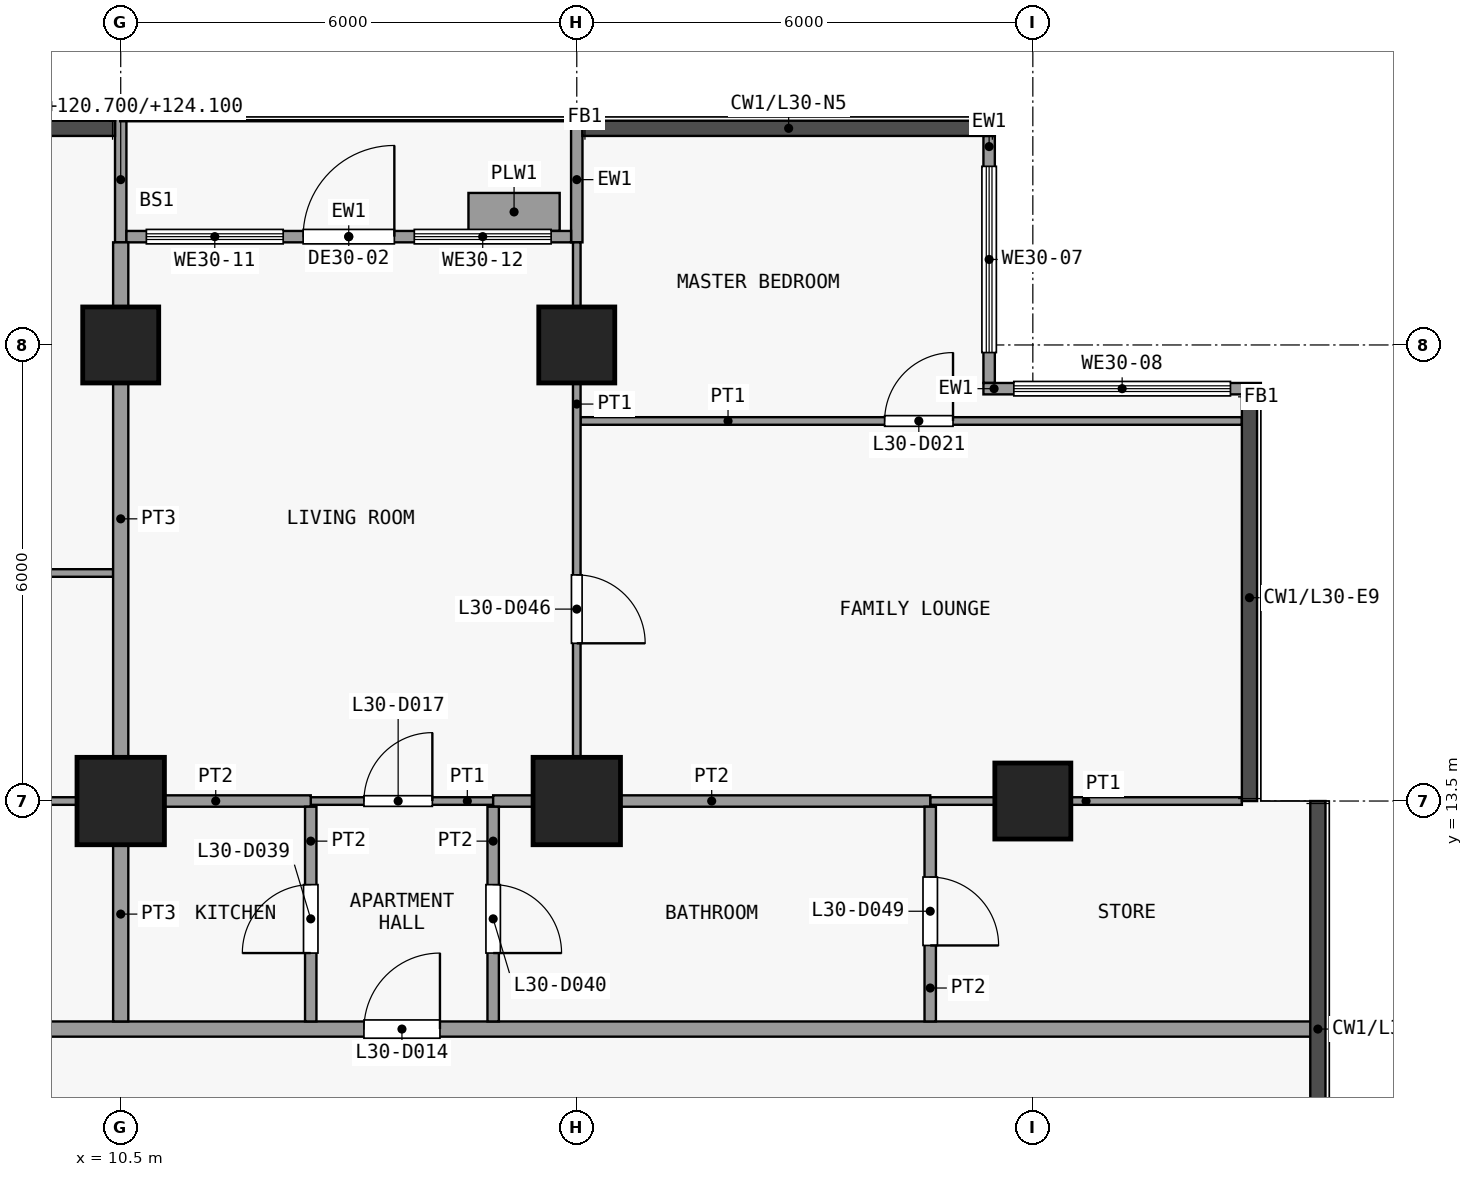
"""IFC4 building model, lengths in metres.
Left out: names, types, materials, properties, quantities, classifications, styles, units other than length and angle.
Written with IfcOpenShell. Run it as: python <this file> out.ifc"""

import sys

from ifc_helpers import new_model, si_unit, direction, frame, frame_2d, origin, origin_2d, place, context, subcontext, project, spatial, rectangle, extrude, element, fill, save


model = new_model("IFC4")
c1 = context("Model", 3, precision=1e-05, world=origin(), true_north=direction((0.0, 1.0)))
c2 = subcontext(c1, "Body", "Model", "MODEL_VIEW")
j1 = project(units=[si_unit("LENGTHUNIT", "METRE"), si_unit("PLANEANGLEUNIT", "RADIAN")], contexts=[c1])
p1 = place(None, origin())
s1 = spatial("IfcSite", under=j1, at=p1, CompositionType="ELEMENT")
p2 = place(p1, origin())
s2 = spatial("IfcBuilding", under=s1, at=p2, CompositionType="ELEMENT")
p3 = place(p2, frame((0.0, 0.0, 120.7)))
s3 = spatial("IfcBuildingStorey", under=s2, at=p3, CompositionType="ELEMENT", Elevation=120.7)
p4 = place(p3, frame((10.5, 13.5, 0.0), z_axis=(0.0, 0.0, 1.0), x_axis=(1.0, 0.0, 0.0)))
e1 = element("IfcColumn", 1, at=p4, inside=s3, PredefinedType="COLUMN", context=c2, shape_type="SweptSolid", body=[
    extrude(rectangle(XDim=1.15, YDim=1.15, at=origin_2d()), origin(), (0.0, 0.0, 1.0), 3.6),
])
p5 = place(p3, frame((10.5, 19.5, 0.0), z_axis=(0.0, 0.0, 1.0), x_axis=(1.0, 0.0, 0.0)))
e2 = element("IfcColumn", 2, at=p5, inside=s3, PredefinedType="COLUMN", context=c2, shape_type="SweptSolid", body=[
    extrude(rectangle(XDim=1.0, YDim=1.0, at=origin_2d()), origin(), (0.0, 0.0, 1.0), 3.6),
])
p6 = place(p3, frame((16.5, 13.5, 0.0), z_axis=(0.0, 0.0, 1.0), x_axis=(1.0, 0.0, 0.0)))
e3 = element("IfcColumn", 3, at=p6, inside=s3, PredefinedType="COLUMN", context=c2, shape_type="SweptSolid", body=[
    extrude(rectangle(XDim=1.15, YDim=1.15, at=origin_2d()), origin(), (0.0, 0.0, 1.0), 3.6),
])
for number, where, z_axis, x_axis in (
    (4, (16.5, 19.5, 0.0), (0.0, 0.0, 1.0), (1.0, 0.0, 0.0)),
    (5, (22.5, 13.5, 0.0), (0.0, 0.0, 1.0), (1.0, 0.0, 0.0)),
):
    element("IfcColumn", number, at=place(p3, frame(where, z_axis=z_axis, x_axis=x_axis)), inside=s3, PredefinedType="COLUMN", context=c2, shape_type="SweptSolid", body=[
        extrude(rectangle(XDim=1.0, YDim=1.0, at=origin_2d()), origin(), (0.0, 0.0, 1.0), 3.6),
    ])
p7 = place(p3, frame((21.925, 22.25, 0.0), z_axis=(0.0, 0.0, 1.0), x_axis=(0.0, -1.0, 0.0)))
e6 = element("IfcWall", 6, at=p7, inside=s3, PredefinedType="SOLIDWALL", context=c2, shape_type="SweptSolid", body=[
    extrude(rectangle(XDim=3.25, YDim=0.15, at=frame_2d((1.625, 0.0))), origin(), (0.0, 0.0, 1.0), 3.3),
])
p8 = place(p7, frame((0.4, 0.0, 0.9)))
e7 = element("IfcOpeningElement", 7, at=p8, cuts=e6, PredefinedType="OPENING", context=c2, shape_type="SweptSolid", body=[
    extrude(rectangle(XDim=2.45, YDim=2.4, at=frame_2d((1.225, 1.2))), frame((0.0, 0.085, 0.0), z_axis=(0.0, -1.0, 0.0), x_axis=(1.0, 0.0, 0.0)), (0.0, 0.0, 1.0), 0.17),
])
p9 = place(p3, frame((21.85, 18.925, 0.0), z_axis=(0.0, 0.0, 1.0), x_axis=(1.0, 0.0, 0.0)))
e8 = element("IfcWall", 8, at=p9, inside=s3, PredefinedType="SOLIDWALL", context=c2, shape_type="SweptSolid", body=[
    extrude(rectangle(XDim=3.65, YDim=0.15, at=frame_2d((1.825, 0.0))), origin(), (0.0, 0.0, 1.0), 3.3),
])
p10 = place(p9, frame((0.4, 0.0, 0.9)))
e9 = element("IfcOpeningElement", 9, at=p10, cuts=e8, PredefinedType="OPENING", context=c2, shape_type="SweptSolid", body=[
    extrude(rectangle(XDim=2.85, YDim=2.4, at=frame_2d((1.425, 1.2))), frame((0.0, 0.085, 0.0), z_axis=(0.0, -1.0, 0.0), x_axis=(1.0, 0.0, 0.0)), (0.0, 0.0, 1.0), 0.17),
])
p11 = place(p3, frame((10.5, 20.85, 0.0), z_axis=(0.0, 0.0, 1.0), x_axis=(0.0, 1.0, 0.0)))
e10 = element("IfcWall", 10, at=p11, inside=s3, PredefinedType="SOLIDWALL", context=c2, shape_type="SweptSolid", body=[
    extrude(rectangle(XDim=1.65, YDim=0.15, at=frame_2d((0.825, 0.0))), origin(), (0.0, 0.0, 1.0), 3.4),
])
p12 = place(p3, frame((16.5, 20.85, 0.0), z_axis=(0.0, 0.0, 1.0), x_axis=(0.0, 1.0, 0.0)))
e11 = element("IfcWall", 11, at=p12, inside=s3, PredefinedType="SOLIDWALL", context=c2, shape_type="SweptSolid", body=[
    extrude(rectangle(XDim=1.65, YDim=0.15, at=frame_2d((0.825, 0.0))), origin(), (0.0, 0.0, 1.0), 3.3),
])
p13 = place(p3, frame((10.575, 20.925, 0.0), z_axis=(0.0, 0.0, 1.0), x_axis=(1.0, 0.0, 0.0)))
e12 = element("IfcWall", 12, at=p13, inside=s3, PredefinedType="SOLIDWALL", context=c2, shape_type="SweptSolid", body=[
    extrude(rectangle(XDim=5.85, YDim=0.15, at=frame_2d((2.925, 0.0))), origin(), (0.0, 0.0, 1.0), 3.3),
])
p14 = place(p13, frame((2.325, 0.0, 0.0)))
e13 = element("IfcOpeningElement", 13, at=p14, cuts=e12, PredefinedType="OPENING", context=c2, shape_type="SweptSolid", body=[
    extrude(rectangle(XDim=1.2, YDim=2.4, at=frame_2d((0.6, 1.2))), frame((0.0, 0.085, 0.0), z_axis=(0.0, -1.0, 0.0), x_axis=(1.0, 0.0, 0.0)), (0.0, 0.0, 1.0), 0.17),
])
p15 = place(p13, frame((0.262, 0.0, 0.9)))
e14 = element("IfcOpeningElement", 14, at=p15, cuts=e12, PredefinedType="OPENING", context=c2, shape_type="SweptSolid", body=[
    extrude(rectangle(XDim=1.8, YDim=2.1, at=frame_2d((0.9, 1.05))), frame((0.0, 0.085, 0.0), z_axis=(0.0, -1.0, 0.0), x_axis=(1.0, 0.0, 0.0)), (0.0, 0.0, 1.0), 0.17),
])
p16 = place(p13, frame((3.788, 0.0, 0.9)))
e15 = element("IfcOpeningElement", 15, at=p16, cuts=e12, PredefinedType="OPENING", context=c2, shape_type="SweptSolid", body=[
    extrude(rectangle(XDim=1.8, YDim=2.1, at=frame_2d((0.9, 1.05))), frame((0.0, 0.085, 0.0), z_axis=(0.0, -1.0, 0.0), x_axis=(1.0, 0.0, 0.0)), (0.0, 0.0, 1.0), 0.17),
])
p17 = place(p3, frame((15.075, 21.25, 0.0), z_axis=(0.0, 0.0, 1.0), x_axis=(1.0, 0.0, 0.0)))
e16 = element("IfcWall", 16, at=p17, inside=s3, PredefinedType="USERDEFINED", context=c2, shape_type="SweptSolid", body=[
    extrude(rectangle(XDim=1.2, YDim=0.5, at=frame_2d((0.6, 0.0))), origin(), (0.0, 0.0, 1.0), 0.9),
])
p18 = place(p3, frame((-23.85, 10.5, 0.0), z_axis=(0.0, 0.0, 1.0), x_axis=(1.0, 0.0, 0.0)))
e17 = element("IfcWall", 17, at=p18, inside=s3, PredefinedType="PARTITIONING", context=c2, shape_type="SweptSolid", body=[
    extrude(rectangle(XDim=50.1, YDim=0.2, at=frame_2d((25.05, 0.0))), origin(), (0.0, 0.0, 1.0), 3.3),
])
p19 = place(p18, frame((3.05, 0.0, 0.0)))
e18 = element("IfcOpeningElement", 18, at=p19, cuts=e17, PredefinedType="OPENING", context=c2, shape_type="SweptSolid", body=[
    extrude(rectangle(XDim=1.0, YDim=2.1, at=frame_2d((0.5, 1.05))), frame((0.0, 0.11, 0.0), z_axis=(0.0, -1.0, 0.0), x_axis=(1.0, 0.0, 0.0)), (0.0, 0.0, 1.0), 0.22),
])
p20 = place(p18, frame((17.55, 0.0, 0.0)))
e19 = element("IfcOpeningElement", 19, at=p20, cuts=e17, PredefinedType="OPENING", context=c2, shape_type="SweptSolid", body=[
    extrude(rectangle(XDim=1.0, YDim=2.1, at=frame_2d((0.5, 1.05))), frame((0.0, 0.11, 0.0), z_axis=(0.0, -1.0, 0.0), x_axis=(1.0, 0.0, 0.0)), (0.0, 0.0, 1.0), 0.22),
])
p21 = place(p18, frame((37.55, 0.0, 0.0)))
e20 = element("IfcOpeningElement", 20, at=p21, cuts=e17, PredefinedType="OPENING", context=c2, shape_type="SweptSolid", body=[
    extrude(rectangle(XDim=1.0, YDim=2.1, at=frame_2d((0.5, 1.05))), frame((0.0, 0.11, 0.0), z_axis=(0.0, -1.0, 0.0), x_axis=(1.0, 0.0, 0.0)), (0.0, 0.0, 1.0), 0.22),
])
p22 = place(p3, frame((2.9, 13.5, 0.0), z_axis=(0.0, 0.0, 1.0), x_axis=(1.0, 0.0, 0.0)))
e21 = element("IfcWall", 21, at=p22, inside=s3, PredefinedType="PARTITIONING", context=c2, shape_type="SweptSolid", body=[
    extrude(rectangle(XDim=7.6, YDim=0.1, at=frame_2d((3.8, 0.0))), origin(), (0.0, 0.0, 1.0), 3.3),
])
p23 = place(p3, frame((13.0, 13.5, 0.0), z_axis=(0.0, 0.0, 1.0), x_axis=(1.0, 0.0, 0.0)))
e22 = element("IfcWall", 22, at=p23, inside=s3, PredefinedType="PARTITIONING", context=c2, shape_type="SweptSolid", body=[
    extrude(rectangle(XDim=2.4, YDim=0.1, at=frame_2d((1.2, 0.0))), origin(), (0.0, 0.0, 1.0), 3.3),
])
p24 = place(p23, frame((0.7, 0.0, 0.0)))
e23 = element("IfcOpeningElement", 23, at=p24, cuts=e22, PredefinedType="OPENING", context=c2, shape_type="SweptSolid", body=[
    extrude(rectangle(XDim=0.9, YDim=2.1, at=frame_2d((0.45, 1.05))), frame((0.0, 0.06, 0.0), z_axis=(0.0, -1.0, 0.0), x_axis=(1.0, 0.0, 0.0)), (0.0, 0.0, 1.0), 0.12),
])
p25 = place(p3, frame((21.15, 13.5, 0.0), z_axis=(0.0, 0.0, 1.0), x_axis=(1.0, 0.0, 0.0)))
e24 = element("IfcWall", 24, at=p25, inside=s3, PredefinedType="PARTITIONING", context=c2, shape_type="SweptSolid", body=[
    extrude(rectangle(XDim=4.1, YDim=0.1, at=frame_2d((2.05, 0.0))), origin(), (0.0, 0.0, 1.0), 3.3),
])
p26 = place(p3, frame((10.5, 13.5, 0.0), z_axis=(0.0, 0.0, 1.0), x_axis=(1.0, 0.0, 0.0)))
e25 = element("IfcWall", 25, at=p26, inside=s3, PredefinedType="PARTITIONING", context=c2, shape_type="SweptSolid", body=[
    extrude(rectangle(XDim=2.5, YDim=0.15, at=frame_2d((1.25, 0.0))), origin(), (0.0, 0.0, 1.0), 3.3),
])
p27 = place(p3, frame((15.4, 13.5, 0.0), z_axis=(0.0, 0.0, 1.0), x_axis=(1.0, 0.0, 0.0)))
e26 = element("IfcWall", 26, at=p27, inside=s3, PredefinedType="PARTITIONING", context=c2, shape_type="SweptSolid", body=[
    extrude(rectangle(XDim=5.75, YDim=0.15, at=frame_2d((2.875, 0.0))), origin(), (0.0, 0.0, 1.0), 3.3),
])
p28 = place(p3, frame((4.55, 16.5, 0.0), z_axis=(0.0, 0.0, 1.0), x_axis=(1.0, 0.0, 0.0)))
e27 = element("IfcWall", 27, at=p28, inside=s3, PredefinedType="PARTITIONING", context=c2, shape_type="SweptSolid", body=[
    extrude(rectangle(XDim=5.85, YDim=0.1, at=frame_2d((2.925, 0.0))), origin(), (0.0, 0.0, 1.0), 3.3),
])
p29 = place(p28, frame((2.5, 0.0, 0.0)))
e28 = element("IfcOpeningElement", 28, at=p29, cuts=e27, PredefinedType="OPENING", context=c2, shape_type="SweptSolid", body=[
    extrude(rectangle(XDim=0.9, YDim=2.1, at=frame_2d((0.45, 1.05))), frame((0.0, 0.06, 0.0), z_axis=(0.0, -1.0, 0.0), x_axis=(1.0, 0.0, 0.0)), (0.0, 0.0, 1.0), 0.12),
])
p30 = place(p3, frame((16.55, 18.5, 0.0), z_axis=(0.0, 0.0, 1.0), x_axis=(1.0, 0.0, 0.0)))
e29 = element("IfcWall", 29, at=p30, inside=s3, PredefinedType="PARTITIONING", context=c2, shape_type="SweptSolid", body=[
    extrude(rectangle(XDim=8.7, YDim=0.1, at=frame_2d((4.35, 0.0))), origin(), (0.0, 0.0, 1.0), 3.3),
])
p31 = place(p30, frame((4.0, 0.0, 0.0)))
e30 = element("IfcOpeningElement", 30, at=p31, cuts=e29, PredefinedType="OPENING", context=c2, shape_type="SweptSolid", body=[
    extrude(rectangle(XDim=0.9, YDim=2.1, at=frame_2d((0.45, 1.05))), frame((0.0, 0.06, 0.0), z_axis=(0.0, -1.0, 0.0), x_axis=(1.0, 0.0, 0.0)), (0.0, 0.0, 1.0), 0.12),
])
p32 = place(p3, frame((10.5, 10.6, 0.0), z_axis=(0.0, 0.0, 1.0), x_axis=(0.0, 1.0, 0.0)))
e31 = element("IfcWall", 31, at=p32, inside=s3, PredefinedType="PARTITIONING", context=c2, shape_type="SweptSolid", body=[
    extrude(rectangle(XDim=2.825, YDim=0.2, at=frame_2d((1.413, 0.0))), origin(), (0.0, 0.0, 1.0), 3.3),
])
p33 = place(p3, frame((10.5, 13.575, 0.0), z_axis=(0.0, 0.0, 1.0), x_axis=(0.0, 1.0, 0.0)))
e32 = element("IfcWall", 32, at=p33, inside=s3, PredefinedType="PARTITIONING", context=c2, shape_type="SweptSolid", body=[
    extrude(rectangle(XDim=7.275, YDim=0.2, at=frame_2d((3.638, 0.0))), origin(), (0.0, 0.0, 1.0), 3.3),
])
p34 = place(p3, frame((13.0, 10.6, 0.0), z_axis=(0.0, 0.0, 1.0), x_axis=(0.0, 1.0, 0.0)))
e33 = element("IfcWall", 33, at=p34, inside=s3, PredefinedType="PARTITIONING", context=c2, shape_type="SweptSolid", body=[
    extrude(rectangle(XDim=2.825, YDim=0.15, at=frame_2d((1.413, 0.0))), origin(), (0.0, 0.0, 1.0), 3.3),
])
p35 = place(p34, frame((0.9, 0.0, 0.0)))
e34 = element("IfcOpeningElement", 34, at=p35, cuts=e33, PredefinedType="OPENING", context=c2, shape_type="SweptSolid", body=[
    extrude(rectangle(XDim=0.9, YDim=2.1, at=frame_2d((0.45, 1.05))), frame((0.0, 0.085, 0.0), z_axis=(0.0, -1.0, 0.0), x_axis=(1.0, 0.0, 0.0)), (0.0, 0.0, 1.0), 0.17),
])
p36 = place(p3, frame((15.4, 10.6, 0.0), z_axis=(0.0, 0.0, 1.0), x_axis=(0.0, 1.0, 0.0)))
e35 = element("IfcWall", 35, at=p36, inside=s3, PredefinedType="PARTITIONING", context=c2, shape_type="SweptSolid", body=[
    extrude(rectangle(XDim=2.825, YDim=0.15, at=frame_2d((1.413, 0.0))), origin(), (0.0, 0.0, 1.0), 3.3),
])
p37 = place(p36, frame((0.9, 0.0, 0.0)))
e36 = element("IfcOpeningElement", 36, at=p37, cuts=e35, PredefinedType="OPENING", context=c2, shape_type="SweptSolid", body=[
    extrude(rectangle(XDim=0.9, YDim=2.1, at=frame_2d((0.45, 1.05))), frame((0.0, 0.085, 0.0), z_axis=(0.0, -1.0, 0.0), x_axis=(1.0, 0.0, 0.0)), (0.0, 0.0, 1.0), 0.17),
])
p38 = place(p3, frame((16.5, 13.575, 0.0), z_axis=(0.0, 0.0, 1.0), x_axis=(0.0, 1.0, 0.0)))
e37 = element("IfcWall", 37, at=p38, inside=s3, PredefinedType="PARTITIONING", context=c2, shape_type="SweptSolid", body=[
    extrude(rectangle(XDim=7.275, YDim=0.1, at=frame_2d((3.638, 0.0))), origin(), (0.0, 0.0, 1.0), 3.3),
])
p39 = place(p38, frame((2.0, 0.0, 0.0)))
e38 = element("IfcOpeningElement", 38, at=p39, cuts=e37, PredefinedType="OPENING", context=c2, shape_type="SweptSolid", body=[
    extrude(rectangle(XDim=0.9, YDim=2.1, at=frame_2d((0.45, 1.05))), frame((0.0, 0.06, 0.0), z_axis=(0.0, -1.0, 0.0), x_axis=(1.0, 0.0, 0.0)), (0.0, 0.0, 1.0), 0.12),
])
p40 = place(p3, frame((21.15, 10.6, 0.0), z_axis=(0.0, 0.0, 1.0), x_axis=(0.0, 1.0, 0.0)))
e39 = element("IfcWall", 39, at=p40, inside=s3, PredefinedType="PARTITIONING", context=c2, shape_type="SweptSolid", body=[
    extrude(rectangle(XDim=2.825, YDim=0.15, at=frame_2d((1.413, 0.0))), origin(), (0.0, 0.0, 1.0), 3.3),
])
p41 = place(p40, frame((1.0, 0.0, 0.0)))
e40 = element("IfcOpeningElement", 40, at=p41, cuts=e39, PredefinedType="OPENING", context=c2, shape_type="SweptSolid", body=[
    extrude(rectangle(XDim=0.9, YDim=2.1, at=frame_2d((0.45, 1.05))), frame((0.0, 0.085, 0.0), z_axis=(0.0, -1.0, 0.0), x_axis=(1.0, 0.0, 0.0)), (0.0, 0.0, 1.0), 0.17),
])
p42 = place(p8, origin())
e41 = element("IfcWindow", 41, at=p42, inside=s3, PartitioningType="SINGLE_PANEL", PredefinedType="WINDOW", context=c2, shape_type="SweptSolid", body=[
    extrude(rectangle(XDim=2.45, YDim=2.4, at=frame_2d((1.225, 1.2))), frame((0.0, 0.03, 0.0), z_axis=(0.0, -1.0, 0.0), x_axis=(1.0, 0.0, 0.0)), (0.0, 0.0, 1.0), 0.06),
])
fill(e7, e41)
p43 = place(p10, origin())
e42 = element("IfcWindow", 42, at=p43, inside=s3, PartitioningType="SINGLE_PANEL", PredefinedType="WINDOW", context=c2, shape_type="SweptSolid", body=[
    extrude(rectangle(XDim=2.85, YDim=2.4, at=frame_2d((1.425, 1.2))), frame((0.0, 0.03, 0.0), z_axis=(0.0, -1.0, 0.0), x_axis=(1.0, 0.0, 0.0)), (0.0, 0.0, 1.0), 0.06),
])
fill(e9, e42)
p44 = place(p14, origin())
e43 = element("IfcDoor", 43, at=p44, inside=s3, OperationType="SINGLE_SWING_RIGHT", PredefinedType="DOOR", context=c2, shape_type="SweptSolid", body=[
    extrude(rectangle(XDim=1.2, YDim=2.4, at=frame_2d((0.6, 1.2))), frame((0.0, 0.025, 0.0), z_axis=(0.0, -1.0, 0.0), x_axis=(1.0, 0.0, 0.0)), (0.0, 0.0, 1.0), 0.05),
])
fill(e13, e43)
p45 = place(p15, origin())
e44 = element("IfcWindow", 44, at=p45, inside=s3, PartitioningType="SINGLE_PANEL", PredefinedType="WINDOW", context=c2, shape_type="SweptSolid", body=[
    extrude(rectangle(XDim=1.8, YDim=2.1, at=frame_2d((0.9, 1.05))), frame((0.0, 0.03, 0.0), z_axis=(0.0, -1.0, 0.0), x_axis=(1.0, 0.0, 0.0)), (0.0, 0.0, 1.0), 0.06),
])
fill(e14, e44)
p46 = place(p16, origin())
e45 = element("IfcWindow", 45, at=p46, inside=s3, PartitioningType="SINGLE_PANEL", PredefinedType="WINDOW", context=c2, shape_type="SweptSolid", body=[
    extrude(rectangle(XDim=1.8, YDim=2.1, at=frame_2d((0.9, 1.05))), frame((0.0, 0.03, 0.0), z_axis=(0.0, -1.0, 0.0), x_axis=(1.0, 0.0, 0.0)), (0.0, 0.0, 1.0), 0.06),
])
fill(e15, e45)
p47 = place(p21, origin())
e46 = element("IfcDoor", 46, at=p47, inside=s3, OperationType="SINGLE_SWING_LEFT", PredefinedType="DOOR", context=c2, shape_type="SweptSolid", body=[
    extrude(rectangle(XDim=1.0, YDim=2.1, at=frame_2d((0.5, 1.05))), frame((0.0, 0.025, 0.0), z_axis=(0.0, -1.0, 0.0), x_axis=(1.0, 0.0, 0.0)), (0.0, 0.0, 1.0), 0.05),
])
fill(e20, e46)
p48 = place(p24, origin())
e47 = element("IfcDoor", 47, at=p48, inside=s3, OperationType="SINGLE_SWING_LEFT", PredefinedType="DOOR", context=c2, shape_type="SweptSolid", body=[
    extrude(rectangle(XDim=0.9, YDim=2.1, at=frame_2d((0.45, 1.05))), frame((0.0, 0.025, 0.0), z_axis=(0.0, -1.0, 0.0), x_axis=(1.0, 0.0, 0.0)), (0.0, 0.0, 1.0), 0.05),
])
fill(e23, e47)
p49 = place(p31, origin())
e48 = element("IfcDoor", 48, at=p49, inside=s3, OperationType="SINGLE_SWING_LEFT", PredefinedType="DOOR", context=c2, shape_type="SweptSolid", body=[
    extrude(rectangle(XDim=0.9, YDim=2.1, at=frame_2d((0.45, 1.05))), frame((0.0, 0.025, 0.0), z_axis=(0.0, -1.0, 0.0), x_axis=(1.0, 0.0, 0.0)), (0.0, 0.0, 1.0), 0.05),
])
fill(e30, e48)
p50 = place(p35, origin())
e49 = element("IfcDoor", 49, at=p50, inside=s3, OperationType="SINGLE_SWING_RIGHT", PredefinedType="DOOR", context=c2, shape_type="SweptSolid", body=[
    extrude(rectangle(XDim=0.9, YDim=2.1, at=frame_2d((0.45, 1.05))), frame((0.0, 0.025, 0.0), z_axis=(0.0, -1.0, 0.0), x_axis=(1.0, 0.0, 0.0)), (0.0, 0.0, 1.0), 0.05),
])
fill(e34, e49)
p51 = place(p37, origin())
e50 = element("IfcDoor", 50, at=p51, inside=s3, OperationType="SINGLE_SWING_LEFT", PredefinedType="DOOR", context=c2, shape_type="SweptSolid", body=[
    extrude(rectangle(XDim=0.9, YDim=2.1, at=frame_2d((0.45, 1.05))), frame((0.0, 0.025, 0.0), z_axis=(0.0, -1.0, 0.0), x_axis=(1.0, 0.0, 0.0)), (0.0, 0.0, 1.0), 0.05),
])
fill(e36, e50)
p52 = place(p39, origin())
e51 = element("IfcDoor", 51, at=p52, inside=s3, OperationType="SINGLE_SWING_LEFT", PredefinedType="DOOR", context=c2, shape_type="SweptSolid", body=[
    extrude(rectangle(XDim=0.9, YDim=2.1, at=frame_2d((0.45, 1.05))), frame((0.0, 0.025, 0.0), z_axis=(0.0, -1.0, 0.0), x_axis=(1.0, 0.0, 0.0)), (0.0, 0.0, 1.0), 0.05),
])
fill(e38, e51)
p53 = place(p41, origin())
e52 = element("IfcDoor", 52, at=p53, inside=s3, OperationType="SINGLE_SWING_LEFT", PredefinedType="DOOR", context=c2, shape_type="SweptSolid", body=[
    extrude(rectangle(XDim=0.9, YDim=2.1, at=frame_2d((0.45, 1.05))), frame((0.0, 0.025, 0.0), z_axis=(0.0, -1.0, 0.0), x_axis=(1.0, 0.0, 0.0)), (0.0, 0.0, 1.0), 0.05),
])
fill(e40, e52)
save(model, sys.argv[1])
